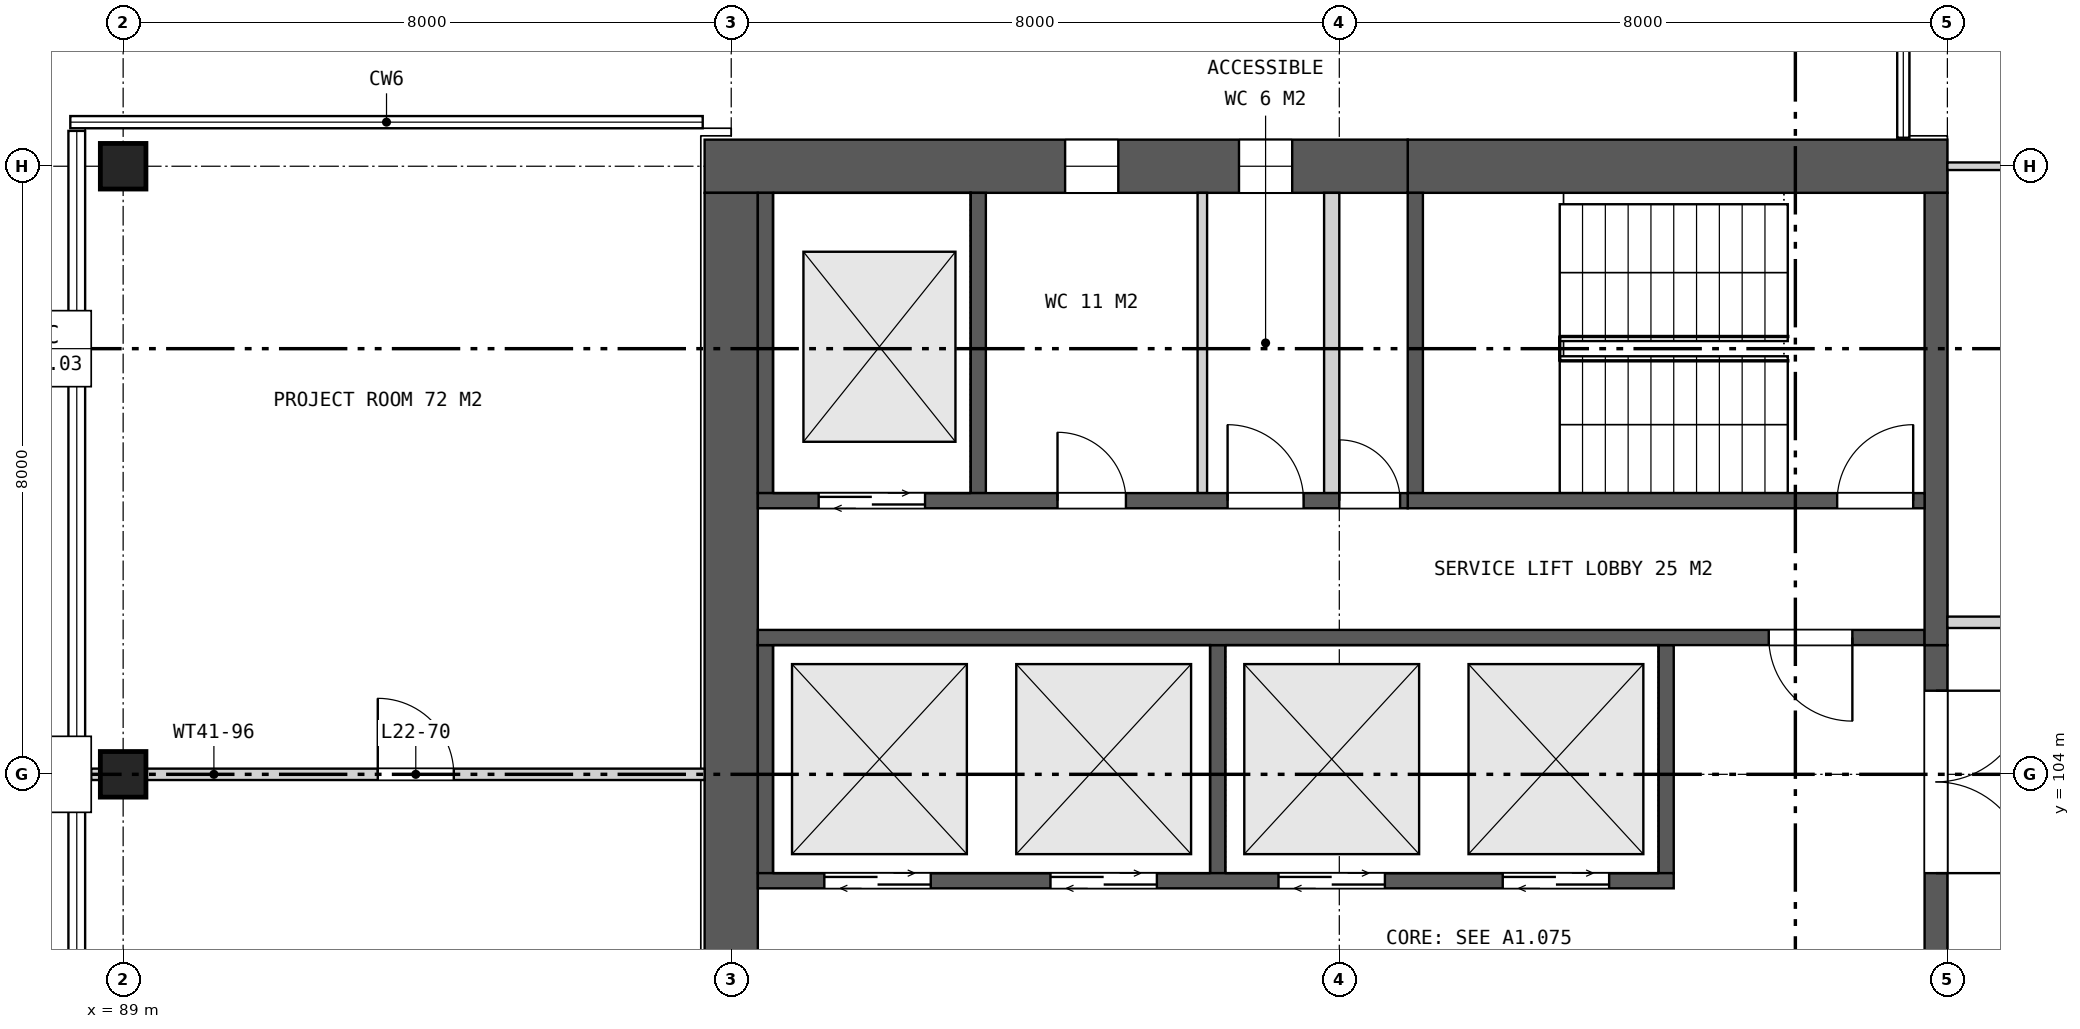
"""IFC4 building model, lengths in metres.
Left out: names, types, materials, properties, quantities, classifications, styles, units other than length and angle.
Written with IfcOpenShell. Run it as: python <this file> out.ifc"""

import sys

from ifc_helpers import new_model, si_unit, direction, frame, frame_2d, origin, origin_2d, place, context, subcontext, project, spatial, rectangle, extrude, element, fill, save


model = new_model("IFC4")
c1 = context("Model", 3, precision=1e-05, world=origin(), true_north=direction((0.0, 1.0)))
c2 = subcontext(c1, "Body", "Model", "MODEL_VIEW")
j1 = project(units=[si_unit("LENGTHUNIT", "METRE"), si_unit("PLANEANGLEUNIT", "RADIAN")], contexts=[c1])
p1 = place(None, origin())
s1 = spatial("IfcSite", under=j1, at=p1, CompositionType="ELEMENT")
p2 = place(p1, origin())
s2 = spatial("IfcBuilding", under=s1, at=p2, CompositionType="ELEMENT")
p3 = place(p2, frame((0.0, 0.0, 112.7)))
s3 = spatial("IfcBuildingStorey", under=s2, at=p3, CompositionType="ELEMENT", Elevation=112.7)
for number, where, z_axis, x_axis in (
    (1, (89.0, 104.0, 0.0), (0.0, 0.0, 1.0), (1.0, 0.0, 0.0)),
    (2, (89.0, 112.0, 0.0), (0.0, 0.0, 1.0), (1.0, 0.0, 0.0)),
):
    element("IfcColumn", number, at=place(p3, frame(where, z_axis=z_axis, x_axis=x_axis)), inside=s3, PredefinedType="COLUMN", context=c2, shape_type="SweptSolid", body=[
        extrude(rectangle(XDim=0.6, YDim=0.6, at=origin_2d()), origin(), (0.0, 0.0, 1.0), 4.2),
    ])
p4 = place(p3, frame((113.0, 112.0, 0.0), z_axis=(0.0, 0.0, 1.0), x_axis=(-1.0, 0.0, 0.0)))
e3 = element("IfcWall", 3, at=p4, inside=s3, PredefinedType="SHEAR", context=c2, shape_type="SweptSolid", body=[
    extrude(rectangle(XDim=7.1, YDim=0.7, at=frame_2d((3.55, 0.0))), origin(), (0.0, 0.0, 1.0), 4.2),
])
p5 = place(p3, frame((105.9, 112.0, 0.0), z_axis=(0.0, 0.0, 1.0), x_axis=(-1.0, 0.0, 0.0)))
e4 = element("IfcWall", 4, at=p5, inside=s3, PredefinedType="SHEAR", context=c2, shape_type="SweptSolid", body=[
    extrude(rectangle(XDim=9.25, YDim=0.7, at=frame_2d((4.625, 0.0))), origin(), (0.0, 0.0, 1.0), 4.2),
])
p6 = place(p5, frame((1.52, 0.0, 1.5)))
e5 = element("IfcOpeningElement", 5, at=p6, cuts=e4, PredefinedType="OPENING", context=c2, shape_type="SweptSolid", body=[
    extrude(rectangle(XDim=0.7, YDim=0.9, at=frame_2d((0.35, 0.45))), frame((0.0, 0.36, 0.0), z_axis=(0.0, -1.0, 0.0), x_axis=(1.0, 0.0, 0.0)), (0.0, 0.0, 1.0), 0.72),
])
p7 = place(p5, frame((3.807, 0.0, 1.5)))
e6 = element("IfcOpeningElement", 6, at=p7, cuts=e4, PredefinedType="OPENING", context=c2, shape_type="SweptSolid", body=[
    extrude(rectangle(XDim=0.7, YDim=0.9, at=frame_2d((0.35, 0.45))), frame((0.0, 0.36, 0.0), z_axis=(0.0, -1.0, 0.0), x_axis=(1.0, 0.0, 0.0)), (0.0, 0.0, 1.0), 0.72),
])
p8 = place(p3, frame((97.0, 111.65, 0.0), z_axis=(0.0, 0.0, 1.0), x_axis=(0.0, -1.0, 0.0)))
e7 = element("IfcWall", 7, at=p8, inside=s3, PredefinedType="SHEAR", context=c2, shape_type="SweptSolid", body=[
    extrude(rectangle(XDim=23.3, YDim=0.7, at=frame_2d((11.65, 0.0))), origin(), (0.0, 0.0, 1.0), 4.2),
])
p9 = place(p8, frame((10.45, 0.0, 0.0)))
e8 = element("IfcOpeningElement", 8, at=p9, cuts=e7, PredefinedType="OPENING", context=c2, shape_type="SweptSolid", body=[
    extrude(rectangle(XDim=2.4, YDim=2.4, at=frame_2d((1.2, 1.2))), frame((0.0, 0.36, 0.0), z_axis=(0.0, -1.0, 0.0), x_axis=(1.0, 0.0, 0.0)), (0.0, 0.0, 1.0), 0.72),
])
p10 = place(p3, frame((112.85, 105.7, 0.0), z_axis=(0.0, 0.0, 1.0), x_axis=(0.0, -1.0, 0.0)))
e9 = element("IfcWall", 9, at=p10, inside=s3, PredefinedType="SHEAR", context=c2, shape_type="SweptSolid", body=[
    extrude(rectangle(XDim=11.4, YDim=0.3, at=frame_2d((5.7, 0.0))), origin(), (0.0, 0.0, 1.0), 4.2),
])
p11 = place(p10, frame((0.6, 0.0, 0.0)))
e10 = element("IfcOpeningElement", 10, at=p11, cuts=e9, PredefinedType="OPENING", context=c2, shape_type="SweptSolid", body=[
    extrude(rectangle(XDim=2.4, YDim=2.4, at=frame_2d((1.2, 1.2))), frame((0.0, 0.16, 0.0), z_axis=(0.0, -1.0, 0.0), x_axis=(1.0, 0.0, 0.0)), (0.0, 0.0, 1.0), 0.32),
])
p12 = place(p10, frame((4.5, 0.0, 0.0)))
e11 = element("IfcOpeningElement", 11, at=p12, cuts=e9, PredefinedType="OPENING", context=c2, shape_type="SweptSolid", body=[
    extrude(rectangle(XDim=2.4, YDim=2.4, at=frame_2d((1.2, 1.2))), frame((0.0, 0.16, 0.0), z_axis=(0.0, -1.0, 0.0), x_axis=(1.0, 0.0, 0.0)), (0.0, 0.0, 1.0), 0.32),
])
p13 = place(p10, frame((8.4, 0.0, 0.0)))
e12 = element("IfcOpeningElement", 12, at=p13, cuts=e9, PredefinedType="OPENING", context=c2, shape_type="SweptSolid", body=[
    extrude(rectangle(XDim=2.4, YDim=2.4, at=frame_2d((1.2, 1.2))), frame((0.0, 0.16, 0.0), z_axis=(0.0, -1.0, 0.0), x_axis=(1.0, 0.0, 0.0)), (0.0, 0.0, 1.0), 0.32),
])
for number, where, z_axis, x_axis in (
    (13, (109.3, 105.7, 0.0), (0.0, 0.0, 1.0), (0.0, -1.0, 0.0)),
    (14, (103.4, 105.7, 0.0), (0.0, 0.0, 1.0), (0.0, -1.0, 0.0)),
    (15, (97.45, 105.7, 0.0), (0.0, 0.0, 1.0), (0.0, -1.0, 0.0)),
):
    element("IfcWall", number, at=place(p3, frame(where, z_axis=z_axis, x_axis=x_axis)), inside=s3, PredefinedType="SHEAR", context=c2, shape_type="SweptSolid", body=[
        extrude(rectangle(XDim=3.0, YDim=0.2, at=frame_2d((1.5, 0.0))), origin(), (0.0, 0.0, 1.0), 4.2),
    ])
p14 = place(p3, frame((109.4, 102.6, 0.0), z_axis=(0.0, 0.0, 1.0), x_axis=(-1.0, 0.0, 0.0)))
e16 = element("IfcWall", 16, at=p14, inside=s3, PredefinedType="SHEAR", context=c2, shape_type="SweptSolid", body=[
    extrude(rectangle(XDim=12.05, YDim=0.2, at=frame_2d((6.025, 0.0))), origin(), (0.0, 0.0, 1.0), 4.2),
])
p15 = place(p14, frame((0.85, 0.0, 0.0)))
e17 = element("IfcOpeningElement", 17, at=p15, cuts=e16, PredefinedType="OPENING", context=c2, shape_type="SweptSolid", body=[
    extrude(rectangle(XDim=1.4, YDim=2.1, at=frame_2d((0.7, 1.05))), frame((0.0, 0.11, 0.0), z_axis=(0.0, -1.0, 0.0), x_axis=(1.0, 0.0, 0.0)), (0.0, 0.0, 1.0), 0.22),
])
p16 = place(p14, frame((3.8, 0.0, 0.0)))
e18 = element("IfcOpeningElement", 18, at=p16, cuts=e16, PredefinedType="OPENING", context=c2, shape_type="SweptSolid", body=[
    extrude(rectangle(XDim=1.4, YDim=2.1, at=frame_2d((0.7, 1.05))), frame((0.0, 0.11, 0.0), z_axis=(0.0, -1.0, 0.0), x_axis=(1.0, 0.0, 0.0)), (0.0, 0.0, 1.0), 0.22),
])
p17 = place(p14, frame((6.8, 0.0, 0.0)))
e19 = element("IfcOpeningElement", 19, at=p17, cuts=e16, PredefinedType="OPENING", context=c2, shape_type="SweptSolid", body=[
    extrude(rectangle(XDim=1.4, YDim=2.1, at=frame_2d((0.7, 1.05))), frame((0.0, 0.11, 0.0), z_axis=(0.0, -1.0, 0.0), x_axis=(1.0, 0.0, 0.0)), (0.0, 0.0, 1.0), 0.22),
])
p18 = place(p14, frame((9.775, 0.0, 0.0)))
e20 = element("IfcOpeningElement", 20, at=p18, cuts=e16, PredefinedType="OPENING", context=c2, shape_type="SweptSolid", body=[
    extrude(rectangle(XDim=1.4, YDim=2.1, at=frame_2d((0.7, 1.05))), frame((0.0, 0.11, 0.0), z_axis=(0.0, -1.0, 0.0), x_axis=(1.0, 0.0, 0.0)), (0.0, 0.0, 1.0), 0.22),
])
p19 = place(p3, frame((112.7, 105.8, 0.0), z_axis=(0.0, 0.0, 1.0), x_axis=(-1.0, 0.0, 0.0)))
e21 = element("IfcWall", 21, at=p19, inside=s3, PredefinedType="SHEAR", context=c2, shape_type="SweptSolid", body=[
    extrude(rectangle(XDim=15.35, YDim=0.2, at=frame_2d((7.675, 0.0))), origin(), (0.0, 0.0, 1.0), 4.2),
])
p20 = place(p19, frame((0.95, 0.0, 0.0)))
e22 = element("IfcOpeningElement", 22, at=p20, cuts=e21, PredefinedType="OPENING", context=c2, shape_type="SweptSolid", body=[
    extrude(rectangle(XDim=1.1, YDim=2.1, at=frame_2d((0.55, 1.05))), frame((0.0, 0.11, 0.0), z_axis=(0.0, -1.0, 0.0), x_axis=(1.0, 0.0, 0.0)), (0.0, 0.0, 1.0), 0.22),
])
p21 = place(p3, frame((112.85, 111.65, 0.0), z_axis=(0.0, 0.0, 1.0), x_axis=(0.0, -1.0, 0.0)))
e23 = element("IfcWall", 23, at=p21, inside=s3, PredefinedType="SHEAR", context=c2, shape_type="SweptSolid", body=[
    extrude(rectangle(XDim=5.95, YDim=0.3, at=frame_2d((2.975, 0.0))), origin(), (0.0, 0.0, 1.0), 4.2),
])
for number, where, z_axis, x_axis in (
    (24, (106.0, 111.65, 0.0), (0.0, 0.0, 1.0), (0.0, -1.0, 0.0)),
    (25, (100.25, 111.65, 0.0), (0.0, 0.0, 1.0), (0.0, -1.0, 0.0)),
    (26, (97.45, 111.65, 0.0), (0.0, 0.0, 1.0), (0.0, -1.0, 0.0)),
):
    element("IfcWall", number, at=place(p3, frame(where, z_axis=z_axis, x_axis=x_axis)), inside=s3, PredefinedType="SHEAR", context=c2, shape_type="SweptSolid", body=[
        extrude(rectangle(XDim=3.95, YDim=0.2, at=frame_2d((1.975, 0.0))), origin(), (0.0, 0.0, 1.0), 4.2),
    ])
p22 = place(p3, frame((104.9, 111.65, 0.0), z_axis=(0.0, 0.0, 1.0), x_axis=(0.0, -1.0, 0.0)))
e27 = element("IfcWall", 27, at=p22, inside=s3, PredefinedType="PARTITIONING", context=c2, shape_type="SweptSolid", body=[
    extrude(rectangle(XDim=3.95, YDim=0.2, at=frame_2d((1.975, 0.0))), origin(), (0.0, 0.0, 1.0), 4.2),
])
p23 = place(p3, frame((103.198, 111.65, 0.0), z_axis=(0.0, 0.0, 1.0), x_axis=(0.0, -1.0, 0.0)))
e28 = element("IfcWall", 28, at=p23, inside=s3, PredefinedType="PARTITIONING", context=c2, shape_type="SweptSolid", body=[
    extrude(rectangle(XDim=3.95, YDim=0.125, at=frame_2d((1.975, 0.0))), origin(), (0.0, 0.0, 1.0), 4.2),
])
p24 = place(p3, frame((112.7, 107.6, 0.0), z_axis=(0.0, 0.0, 1.0), x_axis=(-1.0, 0.0, 0.0)))
e29 = element("IfcWall", 29, at=p24, inside=s3, PredefinedType="SHEAR", context=c2, shape_type="SweptSolid", body=[
    extrude(rectangle(XDim=6.8, YDim=0.2, at=frame_2d((3.4, 0.0))), origin(), (0.0, 0.0, 1.0), 4.2),
])
p25 = place(p24, frame((0.15, 0.0, 0.0)))
e30 = element("IfcOpeningElement", 30, at=p25, cuts=e29, PredefinedType="OPENING", context=c2, shape_type="SweptSolid", body=[
    extrude(rectangle(XDim=1.0, YDim=2.1, at=frame_2d((0.5, 1.05))), frame((0.0, 0.11, 0.0), z_axis=(0.0, -1.0, 0.0), x_axis=(1.0, 0.0, 0.0)), (0.0, 0.0, 1.0), 0.22),
])
p26 = place(p3, frame((105.9, 107.6, 0.0), z_axis=(0.0, 0.0, 1.0), x_axis=(-1.0, 0.0, 0.0)))
e31 = element("IfcWall", 31, at=p26, inside=s3, PredefinedType="SHEAR", context=c2, shape_type="SweptSolid", body=[
    extrude(rectangle(XDim=8.55, YDim=0.2, at=frame_2d((4.275, 0.0))), origin(), (0.0, 0.0, 1.0), 4.2),
])
p27 = place(p26, frame((0.1, 0.0, 0.0)))
e32 = element("IfcOpeningElement", 32, at=p27, cuts=e31, PredefinedType="OPENING", context=c2, shape_type="SweptSolid", body=[
    extrude(rectangle(XDim=0.8, YDim=2.1, at=frame_2d((0.4, 1.05))), frame((0.0, 0.11, 0.0), z_axis=(0.0, -1.0, 0.0), x_axis=(1.0, 0.0, 0.0)), (0.0, 0.0, 1.0), 0.22),
])
p28 = place(p26, frame((1.37, 0.0, 0.0)))
e33 = element("IfcOpeningElement", 33, at=p28, cuts=e31, PredefinedType="OPENING", context=c2, shape_type="SweptSolid", body=[
    extrude(rectangle(XDim=1.0, YDim=2.1, at=frame_2d((0.5, 1.05))), frame((0.0, 0.11, 0.0), z_axis=(0.0, -1.0, 0.0), x_axis=(1.0, 0.0, 0.0)), (0.0, 0.0, 1.0), 0.22),
])
p29 = place(p26, frame((3.707, 0.0, 0.0)))
e34 = element("IfcOpeningElement", 34, at=p29, cuts=e31, PredefinedType="OPENING", context=c2, shape_type="SweptSolid", body=[
    extrude(rectangle(XDim=0.9, YDim=2.1, at=frame_2d((0.45, 1.05))), frame((0.0, 0.11, 0.0), z_axis=(0.0, -1.0, 0.0), x_axis=(1.0, 0.0, 0.0)), (0.0, 0.0, 1.0), 0.22),
])
p30 = place(p26, frame((6.35, 0.0, 0.0)))
e35 = element("IfcOpeningElement", 35, at=p30, cuts=e31, PredefinedType="OPENING", context=c2, shape_type="SweptSolid", body=[
    extrude(rectangle(XDim=1.4, YDim=2.1, at=frame_2d((0.7, 1.05))), frame((0.0, 0.11, 0.0), z_axis=(0.0, -1.0, 0.0), x_axis=(1.0, 0.0, 0.0)), (0.0, 0.0, 1.0), 0.22),
])
p31 = place(p3, frame((88.58, 104.0, 0.0), z_axis=(0.0, 0.0, 1.0), x_axis=(1.0, 0.0, 0.0)))
e36 = element("IfcWall", 36, at=p31, inside=s3, PredefinedType="PARTITIONING", context=c2, shape_type="SweptSolid", body=[
    extrude(rectangle(XDim=8.07, YDim=0.15, at=frame_2d((4.035, 0.0))), origin(), (0.0, 0.0, 1.0), 3.437),
])
p32 = place(p31, frame((3.77, 0.0, 0.0)))
e37 = element("IfcOpeningElement", 37, at=p32, cuts=e36, PredefinedType="OPENING", context=c2, shape_type="SweptSolid", body=[
    extrude(rectangle(XDim=1.0, YDim=2.1, at=frame_2d((0.5, 1.05))), frame((0.0, 0.085, 0.0), z_axis=(0.0, -1.0, 0.0), x_axis=(1.0, 0.0, 0.0)), (0.0, 0.0, 1.0), 0.17),
])
p33 = place(p3, frame((113.0, 106.0, 0.0), z_axis=(0.0, 0.0, 1.0), x_axis=(1.0, 0.0, 0.0)))
e38 = element("IfcWall", 38, at=p33, inside=s3, PredefinedType="PARTITIONING", context=c2, shape_type="SweptSolid", body=[
    extrude(rectangle(XDim=10.725, YDim=0.15, at=frame_2d((5.363, 0.0))), origin(), (0.0, 0.0, 1.0), 3.437),
])
p34 = place(p3, frame((113.0, 112.0, 0.0), z_axis=(0.0, 0.0, 1.0), x_axis=(1.0, 0.0, 0.0)))
e39 = element("IfcWall", 39, at=p34, inside=s3, PredefinedType="PARTITIONING", context=c2, shape_type="SweptSolid", body=[
    extrude(rectangle(XDim=10.725, YDim=0.1, at=frame_2d((5.363, 0.0))), origin(), (0.0, 0.0, 1.0), 3.437),
])
p35 = place(p6, origin())
e40 = element("IfcWindow", 40, at=p35, inside=s3, PartitioningType="SINGLE_PANEL", PredefinedType="WINDOW", context=c2, shape_type="SweptSolid", body=[
    extrude(rectangle(XDim=0.7, YDim=0.9, at=frame_2d((0.35, 0.45))), frame((0.0, 0.03, 0.0), z_axis=(0.0, -1.0, 0.0), x_axis=(1.0, 0.0, 0.0)), (0.0, 0.0, 1.0), 0.06),
])
fill(e5, e40)
p36 = place(p7, origin())
e41 = element("IfcWindow", 41, at=p36, inside=s3, PartitioningType="SINGLE_PANEL", PredefinedType="WINDOW", context=c2, shape_type="SweptSolid", body=[
    extrude(rectangle(XDim=0.7, YDim=0.9, at=frame_2d((0.35, 0.45))), frame((0.0, 0.03, 0.0), z_axis=(0.0, -1.0, 0.0), x_axis=(1.0, 0.0, 0.0)), (0.0, 0.0, 1.0), 0.06),
])
fill(e6, e41)
p37 = place(p11, origin())
e42 = element("IfcDoor", 42, at=p37, inside=s3, OperationType="DOUBLE_DOOR_SINGLE_SWING", PredefinedType="DOOR", context=c2, shape_type="SweptSolid", body=[
    extrude(rectangle(XDim=2.4, YDim=2.4, at=frame_2d((1.2, 1.2))), frame((0.0, 0.025, 0.0), z_axis=(0.0, -1.0, 0.0), x_axis=(1.0, 0.0, 0.0)), (0.0, 0.0, 1.0), 0.05),
])
fill(e10, e42)
p38 = place(p15, origin())
e43 = element("IfcDoor", 43, at=p38, inside=s3, OperationType="DOUBLE_DOOR_SLIDING", PredefinedType="DOOR", context=c2, shape_type="SweptSolid", body=[
    extrude(rectangle(XDim=1.4, YDim=2.1, at=frame_2d((0.7, 1.05))), frame((0.0, 0.025, 0.0), z_axis=(0.0, -1.0, 0.0), x_axis=(1.0, 0.0, 0.0)), (0.0, 0.0, 1.0), 0.05),
])
fill(e17, e43)
p39 = place(p16, origin())
e44 = element("IfcDoor", 44, at=p39, inside=s3, OperationType="DOUBLE_DOOR_SLIDING", PredefinedType="DOOR", context=c2, shape_type="SweptSolid", body=[
    extrude(rectangle(XDim=1.4, YDim=2.1, at=frame_2d((0.7, 1.05))), frame((0.0, 0.025, 0.0), z_axis=(0.0, -1.0, 0.0), x_axis=(1.0, 0.0, 0.0)), (0.0, 0.0, 1.0), 0.05),
])
fill(e18, e44)
p40 = place(p17, origin())
e45 = element("IfcDoor", 45, at=p40, inside=s3, OperationType="DOUBLE_DOOR_SLIDING", PredefinedType="DOOR", context=c2, shape_type="SweptSolid", body=[
    extrude(rectangle(XDim=1.4, YDim=2.1, at=frame_2d((0.7, 1.05))), frame((0.0, 0.025, 0.0), z_axis=(0.0, -1.0, 0.0), x_axis=(1.0, 0.0, 0.0)), (0.0, 0.0, 1.0), 0.05),
])
fill(e19, e45)
p41 = place(p18, origin())
e46 = element("IfcDoor", 46, at=p41, inside=s3, OperationType="DOUBLE_DOOR_SLIDING", PredefinedType="DOOR", context=c2, shape_type="SweptSolid", body=[
    extrude(rectangle(XDim=1.4, YDim=2.1, at=frame_2d((0.7, 1.05))), frame((0.0, 0.025, 0.0), z_axis=(0.0, -1.0, 0.0), x_axis=(1.0, 0.0, 0.0)), (0.0, 0.0, 1.0), 0.05),
])
fill(e20, e46)
p42 = place(p20, origin())
e47 = element("IfcDoor", 47, at=p42, inside=s3, OperationType="SINGLE_SWING_LEFT", PredefinedType="DOOR", context=c2, shape_type="SweptSolid", body=[
    extrude(rectangle(XDim=1.1, YDim=2.1, at=frame_2d((0.55, 1.05))), frame((0.0, 0.025, 0.0), z_axis=(0.0, -1.0, 0.0), x_axis=(1.0, 0.0, 0.0)), (0.0, 0.0, 1.0), 0.05),
])
fill(e22, e47)
p43 = place(p25, frame((1.0, 0.0, 0.0), z_axis=(0.0, 0.0, 1.0), x_axis=(-1.0, 0.0, 0.0)))
e48 = element("IfcDoor", 48, at=p43, inside=s3, OperationType="SINGLE_SWING_RIGHT", PredefinedType="DOOR", context=c2, shape_type="SweptSolid", body=[
    extrude(rectangle(XDim=1.0, YDim=2.1, at=frame_2d((0.5, 1.05))), frame((0.0, 0.025, 0.0), z_axis=(0.0, -1.0, 0.0), x_axis=(1.0, 0.0, 0.0)), (0.0, 0.0, 1.0), 0.05),
])
fill(e30, e48)
p44 = place(p27, frame((0.8, 0.0, 0.0), z_axis=(0.0, 0.0, 1.0), x_axis=(-1.0, 0.0, 0.0)))
e49 = element("IfcDoor", 49, at=p44, inside=s3, OperationType="SINGLE_SWING_LEFT", PredefinedType="DOOR", context=c2, shape_type="SweptSolid", body=[
    extrude(rectangle(XDim=0.8, YDim=2.1, at=frame_2d((0.4, 1.05))), frame((0.0, 0.025, 0.0), z_axis=(0.0, -1.0, 0.0), x_axis=(1.0, 0.0, 0.0)), (0.0, 0.0, 1.0), 0.05),
])
fill(e32, e49)
p45 = place(p28, frame((1.0, 0.0, 0.0), z_axis=(0.0, 0.0, 1.0), x_axis=(-1.0, 0.0, 0.0)))
e50 = element("IfcDoor", 50, at=p45, inside=s3, OperationType="SINGLE_SWING_LEFT", PredefinedType="DOOR", context=c2, shape_type="SweptSolid", body=[
    extrude(rectangle(XDim=1.0, YDim=2.1, at=frame_2d((0.5, 1.05))), frame((0.0, 0.025, 0.0), z_axis=(0.0, -1.0, 0.0), x_axis=(1.0, 0.0, 0.0)), (0.0, 0.0, 1.0), 0.05),
])
fill(e33, e50)
p46 = place(p29, frame((0.9, 0.0, 0.0), z_axis=(0.0, 0.0, 1.0), x_axis=(-1.0, 0.0, 0.0)))
e51 = element("IfcDoor", 51, at=p46, inside=s3, OperationType="SINGLE_SWING_LEFT", PredefinedType="DOOR", context=c2, shape_type="SweptSolid", body=[
    extrude(rectangle(XDim=0.9, YDim=2.1, at=frame_2d((0.45, 1.05))), frame((0.0, 0.025, 0.0), z_axis=(0.0, -1.0, 0.0), x_axis=(1.0, 0.0, 0.0)), (0.0, 0.0, 1.0), 0.05),
])
fill(e34, e51)
p47 = place(p30, origin())
e52 = element("IfcDoor", 52, at=p47, inside=s3, OperationType="DOUBLE_DOOR_SLIDING", PredefinedType="DOOR", context=c2, shape_type="SweptSolid", body=[
    extrude(rectangle(XDim=1.4, YDim=2.1, at=frame_2d((0.7, 1.05))), frame((0.0, 0.025, 0.0), z_axis=(0.0, -1.0, 0.0), x_axis=(1.0, 0.0, 0.0)), (0.0, 0.0, 1.0), 0.05),
])
fill(e35, e52)
p48 = place(p32, origin())
e53 = element("IfcDoor", 53, at=p48, inside=s3, OperationType="SINGLE_SWING_LEFT", PredefinedType="DOOR", context=c2, shape_type="SweptSolid", body=[
    extrude(rectangle(XDim=1.0, YDim=2.1, at=frame_2d((0.5, 1.05))), frame((0.0, 0.025, 0.0), z_axis=(0.0, -1.0, 0.0), x_axis=(1.0, 0.0, 0.0)), (0.0, 0.0, 1.0), 0.05),
])
fill(e37, e53)
save(model, sys.argv[1])
